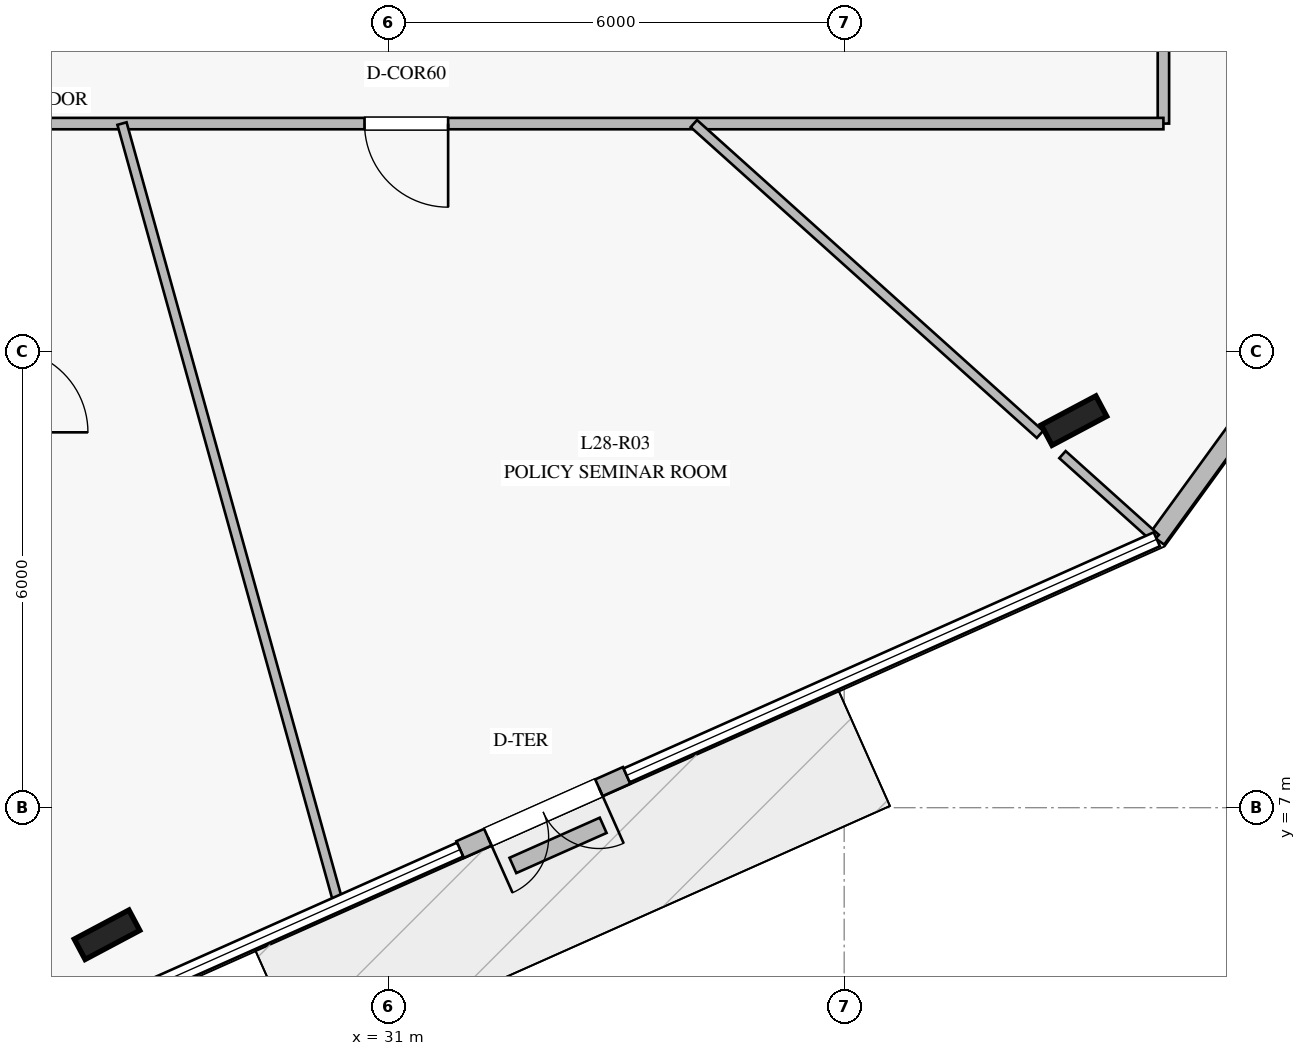
"""IFC4 building model, lengths in metres.
Left out: names, types, materials, properties, quantities, classifications, styles, units other than length and angle.
Written with IfcOpenShell. Run it as: python <this file> out.ifc"""

import sys

from ifc_helpers import new_model, si_unit, direction, frame, frame_2d, origin, origin_2d, place, context, subcontext, project, spatial, rectangle, i_section, extrude, element, fill, save


model = new_model("IFC4")
c1 = context("Model", 3, precision=1e-05, world=origin(), true_north=direction((0.0, 1.0)))
c2 = subcontext(c1, "Body", "Model", "MODEL_VIEW")
j1 = project(units=[si_unit("LENGTHUNIT", "METRE"), si_unit("PLANEANGLEUNIT", "RADIAN")], contexts=[c1])
p1 = place(None, origin())
s1 = spatial("IfcSite", under=j1, at=p1, CompositionType="ELEMENT")
p2 = place(p1, origin())
s2 = spatial("IfcBuilding", under=s1, at=p2, CompositionType="ELEMENT")
p3 = place(p2, frame((0.0, 0.0, 118.4)))
s3 = spatial("IfcBuildingStorey", under=s2, at=p3, CompositionType="ELEMENT", Elevation=118.4)
for number, where, z_axis, x_axis in (
    (1, (27.301, 5.328, 0.0), (0.0, 0.0, 1.0), (0.883, 0.469, 0.0)),
    (2, (40.023, 12.092, 0.0), (0.0, 0.0, 1.0), (0.883, 0.469, 0.0)),
):
    element("IfcColumn", number, at=place(p3, frame(where, z_axis=z_axis, x_axis=x_axis)), inside=s3, PredefinedType="COLUMN", context=c2, shape_type="SweptSolid", body=[
        extrude(i_section(OverallWidth=0.303, OverallDepth=0.814, WebThickness=0.021, FlangeThickness=0.04, at=origin_2d()), origin(), (0.0, 0.0, 1.0), 4.0),
    ])
p4 = place(p3, frame((31.946, 6.449, 0.0), z_axis=(0.0, 0.0, 1.0), x_axis=(0.91351759636, 0.406799214775, 0.0)))
e3 = element("IfcWall", 3, at=p4, inside=s3, PredefinedType="STANDARD", context=c2, shape_type="SweptSolid", body=[
    extrude(rectangle(XDim=2.399, YDim=0.24, at=frame_2d((1.2, 0.0))), origin(), (0.0, 0.0, 1.0), 3.76),
])
p5 = place(p4, frame((0.4, 0.0, 0.0)))
e4 = element("IfcOpeningElement", 4, at=p5, cuts=e3, PredefinedType="OPENING", context=c2, shape_type="SweptSolid", body=[
    extrude(rectangle(XDim=1.6, YDim=2.25, at=frame_2d((0.8, 1.125))), frame((0.0, 0.13, 0.0), z_axis=(0.0, -1.0, 0.0), x_axis=(1.0, 0.0, 0.0)), (0.0, 0.0, 1.0), 0.26),
])
p6 = place(p3, frame((41.113, 10.531, 0.0), z_axis=(0.0, 0.0, 1.0), x_axis=(0.587898873753, 0.80893443136, 0.0)))
e5 = element("IfcWall", 5, at=p6, inside=s3, PredefinedType="STANDARD", context=c2, shape_type="SweptSolid", body=[
    extrude(rectangle(XDim=4.47, YDim=0.24, at=frame_2d((2.235, 0.0))), origin(), (0.0, 0.0, 1.0), 3.76),
])
p7 = place(p3, frame((32.641, 6.24, 0.0), z_axis=(0.0, 0.0, 1.0), x_axis=(0.913788315317, 0.406190736957, 0.0)))
e6 = element("IfcWall", 6, at=p7, inside=s3, PredefinedType="USERDEFINED", context=c2, shape_type="SweptSolid", body=[
    extrude(rectangle(XDim=1.3, YDim=0.22, at=frame_2d((0.65, 0.0))), origin(), (0.0, 0.0, 1.0), 0.4),
])
p8 = place(p3, frame((41.2, 17.8, 0.0), z_axis=(0.0, 0.0, 1.0), x_axis=(0.0, -1.0, 0.0)))
e7 = element("IfcWall", 7, at=p8, inside=s3, PredefinedType="PARTITIONING", context=c2, shape_type="SweptSolid", body=[
    extrude(rectangle(XDim=1.8, YDim=0.15, at=frame_2d((0.9, 0.0))), origin(), (0.0, 0.0, 1.0), 3.21),
])
p9 = place(p3, frame((41.2, 16.0, 0.0), z_axis=(0.0, 0.0, 1.0), x_axis=(-1.0, 0.0, 0.0)))
e8 = element("IfcWall", 8, at=p9, inside=s3, PredefinedType="PARTITIONING", context=c2, shape_type="SweptSolid", body=[
    extrude(rectangle(XDim=15.25, YDim=0.15, at=frame_2d((7.625, 0.0))), origin(), (0.0, 0.0, 1.0), 3.21),
])
p10 = place(p9, frame((9.411, 0.0, 0.0)))
e9 = element("IfcOpeningElement", 9, at=p10, cuts=e8, PredefinedType="OPENING", context=c2, shape_type="SweptSolid", body=[
    extrude(rectangle(XDim=1.1, YDim=2.2, at=frame_2d((0.55, 1.1))), frame((0.0, 0.085, 0.0), z_axis=(0.0, -1.0, 0.0), x_axis=(1.0, 0.0, 0.0)), (0.0, 0.0, 1.0), 0.17),
])
p11 = place(p3, frame((27.498, 16.0, 0.0), z_axis=(0.0, 0.0, 1.0), x_axis=(0.267456760759, -0.963569863126, 0.0)))
e10 = element("IfcWall", 10, at=p11, inside=s3, PredefinedType="PARTITIONING", context=c2, shape_type="SweptSolid", body=[
    extrude(rectangle(XDim=10.634, YDim=0.125, at=frame_2d((5.317, 0.0))), origin(), (0.0, 0.0, 1.0), 3.16),
])
p12 = place(p3, frame((35.022, 16.0, 0.0), z_axis=(0.0, 0.0, 1.0), x_axis=(0.74406125681, -0.668111402472, 0.0)))
e11 = element("IfcWall", 11, at=p12, inside=s3, PredefinedType="PARTITIONING", context=c2, shape_type="SweptSolid", body=[
    extrude(rectangle(XDim=6.12, YDim=0.125, at=frame_2d((3.06, 0.0))), origin(), (0.0, 0.0, 1.0), 3.16),
])
p13 = place(p3, frame((39.872, 11.645, 0.0), z_axis=(0.0, 0.0, 1.0), x_axis=(0.743985633598, -0.668195612826, 0.0)))
e12 = element("IfcWall", 12, at=p13, inside=s3, PredefinedType="PARTITIONING", context=c2, shape_type="SweptSolid", body=[
    extrude(rectangle(XDim=1.649, YDim=0.125, at=frame_2d((0.825, 0.0))), origin(), (0.0, 0.0, 1.0), 3.76),
])
p14 = place(p5, frame((1.6, 0.0, 0.0), z_axis=(0.0, 0.0, 1.0), x_axis=(-1.0, 0.0, 0.0)))
e13 = element("IfcDoor", 13, at=p14, inside=s3, OperationType="DOUBLE_DOOR_SINGLE_SWING", PredefinedType="DOOR", context=c2, shape_type="SweptSolid", body=[
    extrude(rectangle(XDim=1.6, YDim=2.25, at=frame_2d((0.8, 1.125))), frame((0.0, 0.025, 0.0), z_axis=(0.0, -1.0, 0.0), x_axis=(1.0, 0.0, 0.0)), (0.0, 0.0, 1.0), 0.05),
])
fill(e4, e13)
p15 = place(p10, origin())
e14 = element("IfcDoor", 14, at=p15, inside=s3, OperationType="SINGLE_SWING_LEFT", PredefinedType="DOOR", context=c2, shape_type="SweptSolid", body=[
    extrude(rectangle(XDim=1.1, YDim=2.2, at=frame_2d((0.55, 1.1))), frame((0.0, 0.025, 0.0), z_axis=(0.0, -1.0, 0.0), x_axis=(1.0, 0.0, 0.0)), (0.0, 0.0, 1.0), 0.05),
])
fill(e9, e14)
save(model, sys.argv[1])
